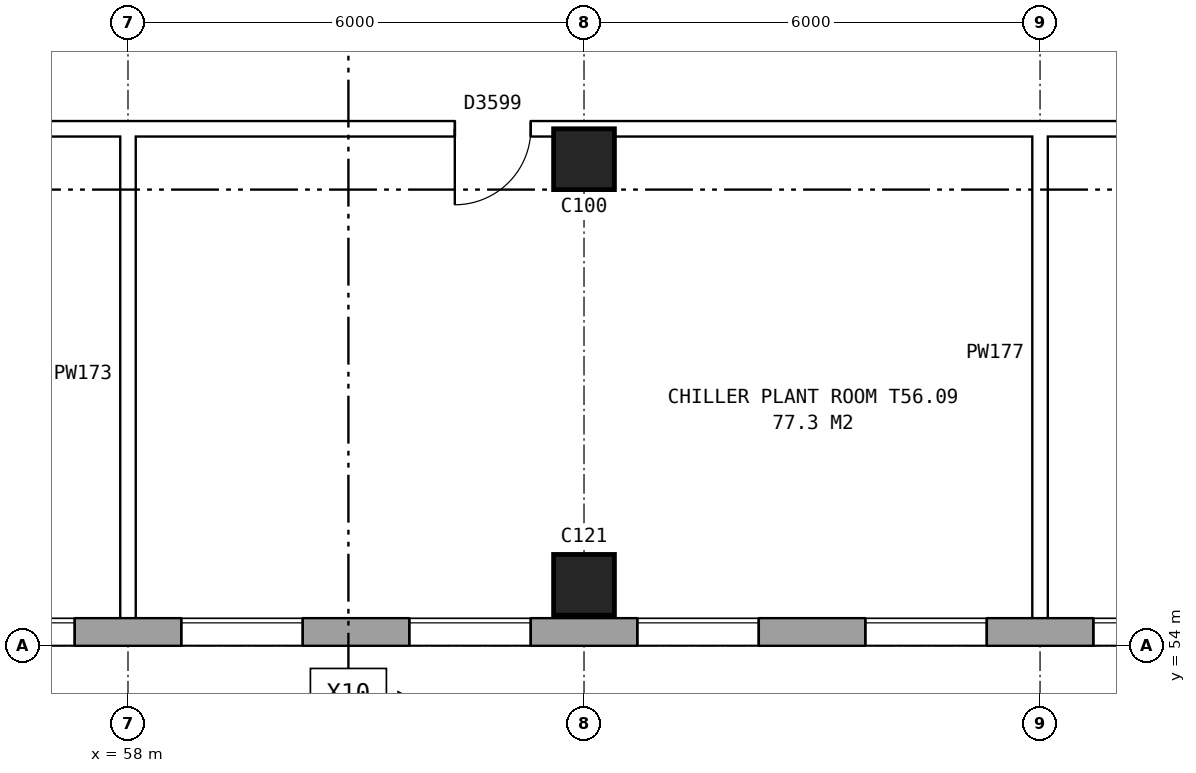
"""IFC4 building model, lengths in metres.
Left out: names, types, materials, properties, quantities, classifications, styles, units other than length and angle.
Written with IfcOpenShell. Run it as: python <this file> out.ifc"""

import sys

from ifc_helpers import new_model, si_unit, direction, frame, frame_2d, origin, origin_2d, place, context, subcontext, project, spatial, rectangle, extrude, element, fill, save


model = new_model("IFC4")
c1 = context("Model", 3, precision=1e-05, world=origin(), true_north=direction((0.0, 1.0)))
c2 = subcontext(c1, "Body", "Model", "MODEL_VIEW")
j1 = project(units=[si_unit("LENGTHUNIT", "METRE"), si_unit("PLANEANGLEUNIT", "RADIAN")], contexts=[c1])
p1 = place(None, origin())
s1 = spatial("IfcSite", under=j1, at=p1, CompositionType="ELEMENT")
p2 = place(p1, origin())
s2 = spatial("IfcBuilding", under=s1, at=p2, CompositionType="ELEMENT")
p3 = place(p2, frame((0.0, 0.0, 198.6)))
s3 = spatial("IfcBuildingStorey", under=s2, at=p3, CompositionType="ELEMENT", Elevation=198.6)
for number, where, z_axis, x_axis in (
    (1, (64.0, 54.8, 0.0), (0.0, 0.0, 1.0), (1.0, 0.0, 0.0)),
    (2, (64.0, 60.4, 0.0), (0.0, 0.0, 1.0), (1.0, 0.0, 0.0)),
):
    element("IfcColumn", number, at=place(p3, frame(where, z_axis=z_axis, x_axis=x_axis)), inside=s3, PredefinedType="COLUMN", context=c2, shape_type="SweptSolid", body=[
        extrude(rectangle(XDim=0.8, YDim=0.8, at=origin_2d()), origin(), (0.0, 0.0, 1.0), 3.7),
    ])
p4 = place(p3, frame((35.075, 54.18, 0.0), z_axis=(0.0, 0.0, 1.0), x_axis=(1.0, 0.0, 0.0)))
e3 = element("IfcWall", 3, at=p4, inside=s3, PredefinedType="STANDARD", context=c2, shape_type="SweptSolid", body=[
    extrude(rectangle(XDim=39.875, YDim=0.36, at=frame_2d((19.938, 0.0))), origin(), (0.0, 0.0, 1.0), 3.7),
])
p5 = place(p4, frame((2.625, 0.0, 1.5)))
e4 = element("IfcOpeningElement", 4, at=p5, cuts=e3, PredefinedType="OPENING", context=c2, shape_type="SweptSolid", body=[
    extrude(rectangle(XDim=1.6, YDim=1.2, at=frame_2d((0.8, 0.6))), frame((0.0, 0.19, 0.0), z_axis=(0.0, -1.0, 0.0), x_axis=(1.0, 0.0, 0.0)), (0.0, 0.0, 1.0), 0.38),
])
p6 = place(p4, frame((5.625, 0.0, 1.5)))
e5 = element("IfcOpeningElement", 5, at=p6, cuts=e3, PredefinedType="OPENING", context=c2, shape_type="SweptSolid", body=[
    extrude(rectangle(XDim=1.6, YDim=1.2, at=frame_2d((0.8, 0.6))), frame((0.0, 0.19, 0.0), z_axis=(0.0, -1.0, 0.0), x_axis=(1.0, 0.0, 0.0)), (0.0, 0.0, 1.0), 0.38),
])
p7 = place(p4, frame((8.625, 0.0, 1.5)))
e6 = element("IfcOpeningElement", 6, at=p7, cuts=e3, PredefinedType="OPENING", context=c2, shape_type="SweptSolid", body=[
    extrude(rectangle(XDim=1.6, YDim=1.2, at=frame_2d((0.8, 0.6))), frame((0.0, 0.19, 0.0), z_axis=(0.0, -1.0, 0.0), x_axis=(1.0, 0.0, 0.0)), (0.0, 0.0, 1.0), 0.38),
])
p8 = place(p4, frame((11.625, 0.0, 1.5)))
e7 = element("IfcOpeningElement", 7, at=p8, cuts=e3, PredefinedType="OPENING", context=c2, shape_type="SweptSolid", body=[
    extrude(rectangle(XDim=1.6, YDim=1.2, at=frame_2d((0.8, 0.6))), frame((0.0, 0.19, 0.0), z_axis=(0.0, -1.0, 0.0), x_axis=(1.0, 0.0, 0.0)), (0.0, 0.0, 1.0), 0.38),
])
p9 = place(p4, frame((14.625, 0.0, 1.5)))
e8 = element("IfcOpeningElement", 8, at=p9, cuts=e3, PredefinedType="OPENING", context=c2, shape_type="SweptSolid", body=[
    extrude(rectangle(XDim=1.6, YDim=1.2, at=frame_2d((0.8, 0.6))), frame((0.0, 0.19, 0.0), z_axis=(0.0, -1.0, 0.0), x_axis=(1.0, 0.0, 0.0)), (0.0, 0.0, 1.0), 0.38),
])
p10 = place(p4, frame((17.625, 0.0, 1.5)))
e9 = element("IfcOpeningElement", 9, at=p10, cuts=e3, PredefinedType="OPENING", context=c2, shape_type="SweptSolid", body=[
    extrude(rectangle(XDim=1.6, YDim=1.2, at=frame_2d((0.8, 0.6))), frame((0.0, 0.19, 0.0), z_axis=(0.0, -1.0, 0.0), x_axis=(1.0, 0.0, 0.0)), (0.0, 0.0, 1.0), 0.38),
])
p11 = place(p4, frame((20.625, 0.0, 1.5)))
e10 = element("IfcOpeningElement", 10, at=p11, cuts=e3, PredefinedType="OPENING", context=c2, shape_type="SweptSolid", body=[
    extrude(rectangle(XDim=1.6, YDim=1.2, at=frame_2d((0.8, 0.6))), frame((0.0, 0.19, 0.0), z_axis=(0.0, -1.0, 0.0), x_axis=(1.0, 0.0, 0.0)), (0.0, 0.0, 1.0), 0.38),
])
p12 = place(p4, frame((23.625, 0.0, 1.5)))
e11 = element("IfcOpeningElement", 11, at=p12, cuts=e3, PredefinedType="OPENING", context=c2, shape_type="SweptSolid", body=[
    extrude(rectangle(XDim=1.6, YDim=1.2, at=frame_2d((0.8, 0.6))), frame((0.0, 0.19, 0.0), z_axis=(0.0, -1.0, 0.0), x_axis=(1.0, 0.0, 0.0)), (0.0, 0.0, 1.0), 0.38),
])
p13 = place(p4, frame((26.625, 0.0, 1.5)))
e12 = element("IfcOpeningElement", 12, at=p13, cuts=e3, PredefinedType="OPENING", context=c2, shape_type="SweptSolid", body=[
    extrude(rectangle(XDim=1.6, YDim=1.2, at=frame_2d((0.8, 0.6))), frame((0.0, 0.19, 0.0), z_axis=(0.0, -1.0, 0.0), x_axis=(1.0, 0.0, 0.0)), (0.0, 0.0, 1.0), 0.38),
])
p14 = place(p4, frame((29.625, 0.0, 1.5)))
e13 = element("IfcOpeningElement", 13, at=p14, cuts=e3, PredefinedType="OPENING", context=c2, shape_type="SweptSolid", body=[
    extrude(rectangle(XDim=1.6, YDim=1.2, at=frame_2d((0.8, 0.6))), frame((0.0, 0.19, 0.0), z_axis=(0.0, -1.0, 0.0), x_axis=(1.0, 0.0, 0.0)), (0.0, 0.0, 1.0), 0.38),
])
p15 = place(p4, frame((32.625, 0.0, 1.5)))
e14 = element("IfcOpeningElement", 14, at=p15, cuts=e3, PredefinedType="OPENING", context=c2, shape_type="SweptSolid", body=[
    extrude(rectangle(XDim=1.6, YDim=1.2, at=frame_2d((0.8, 0.6))), frame((0.0, 0.19, 0.0), z_axis=(0.0, -1.0, 0.0), x_axis=(1.0, 0.0, 0.0)), (0.0, 0.0, 1.0), 0.38),
])
p16 = place(p4, frame((35.625, 0.0, 1.5)))
e15 = element("IfcOpeningElement", 15, at=p16, cuts=e3, PredefinedType="OPENING", context=c2, shape_type="SweptSolid", body=[
    extrude(rectangle(XDim=1.6, YDim=1.2, at=frame_2d((0.8, 0.6))), frame((0.0, 0.19, 0.0), z_axis=(0.0, -1.0, 0.0), x_axis=(1.0, 0.0, 0.0)), (0.0, 0.0, 1.0), 0.38),
])
p17 = place(p3, frame((32.24, 60.8, 0.0), z_axis=(0.0, 0.0, 1.0), x_axis=(1.0, 0.0, 0.0)))
e16 = element("IfcWall", 16, at=p17, inside=s3, PredefinedType="PARTITIONING", context=c2, shape_type="SweptSolid", body=[
    extrude(rectangle(XDim=136.52, YDim=0.2, at=frame_2d((68.26, 0.0))), origin(), (0.0, 0.0, 1.0), 3.7),
])
p18 = place(p17, frame((1.94, 0.0, 0.0)))
e17 = element("IfcOpeningElement", 17, at=p18, cuts=e16, PredefinedType="OPENING", context=c2, shape_type="SweptSolid", body=[
    extrude(rectangle(XDim=1.0, YDim=2.1, at=frame_2d((0.5, 1.05))), frame((0.0, 0.11, 0.0), z_axis=(0.0, -1.0, 0.0), x_axis=(1.0, 0.0, 0.0)), (0.0, 0.0, 1.0), 0.22),
])
p19 = place(p17, frame((8.76, 0.0, 0.0)))
e18 = element("IfcOpeningElement", 18, at=p19, cuts=e16, PredefinedType="OPENING", context=c2, shape_type="SweptSolid", body=[
    extrude(rectangle(XDim=1.0, YDim=2.1, at=frame_2d((0.5, 1.05))), frame((0.0, 0.11, 0.0), z_axis=(0.0, -1.0, 0.0), x_axis=(1.0, 0.0, 0.0)), (0.0, 0.0, 1.0), 0.22),
])
p20 = place(p17, frame((20.46, 0.0, 0.0)))
e19 = element("IfcOpeningElement", 19, at=p20, cuts=e16, PredefinedType="OPENING", context=c2, shape_type="SweptSolid", body=[
    extrude(rectangle(XDim=1.0, YDim=2.1, at=frame_2d((0.5, 1.05))), frame((0.0, 0.11, 0.0), z_axis=(0.0, -1.0, 0.0), x_axis=(1.0, 0.0, 0.0)), (0.0, 0.0, 1.0), 0.22),
])
p21 = place(p17, frame((30.06, 0.0, 0.0)))
e20 = element("IfcOpeningElement", 20, at=p21, cuts=e16, PredefinedType="OPENING", context=c2, shape_type="SweptSolid", body=[
    extrude(rectangle(XDim=1.0, YDim=2.1, at=frame_2d((0.5, 1.05))), frame((0.0, 0.11, 0.0), z_axis=(0.0, -1.0, 0.0), x_axis=(1.0, 0.0, 0.0)), (0.0, 0.0, 1.0), 0.22),
])
p22 = place(p17, frame((40.08, 0.0, 0.0)))
e21 = element("IfcOpeningElement", 21, at=p22, cuts=e16, PredefinedType="OPENING", context=c2, shape_type="SweptSolid", body=[
    extrude(rectangle(XDim=1.0, YDim=2.1, at=frame_2d((0.5, 1.05))), frame((0.0, 0.11, 0.0), z_axis=(0.0, -1.0, 0.0), x_axis=(1.0, 0.0, 0.0)), (0.0, 0.0, 1.0), 0.22),
])
p23 = place(p17, frame((46.517, 0.0, 0.0)))
e22 = element("IfcOpeningElement", 22, at=p23, cuts=e16, PredefinedType="OPENING", context=c2, shape_type="SweptSolid", body=[
    extrude(rectangle(XDim=1.0, YDim=2.1, at=frame_2d((0.5, 1.05))), frame((0.0, 0.11, 0.0), z_axis=(0.0, -1.0, 0.0), x_axis=(1.0, 0.0, 0.0)), (0.0, 0.0, 1.0), 0.22),
])
p24 = place(p17, frame((57.01, 0.0, 0.0)))
e23 = element("IfcOpeningElement", 23, at=p24, cuts=e16, PredefinedType="OPENING", context=c2, shape_type="SweptSolid", body=[
    extrude(rectangle(XDim=1.0, YDim=2.1, at=frame_2d((0.5, 1.05))), frame((0.0, 0.11, 0.0), z_axis=(0.0, -1.0, 0.0), x_axis=(1.0, 0.0, 0.0)), (0.0, 0.0, 1.0), 0.22),
])
p25 = place(p17, frame((70.76, 0.0, 0.0)))
e24 = element("IfcOpeningElement", 24, at=p25, cuts=e16, PredefinedType="OPENING", context=c2, shape_type="SweptSolid", body=[
    extrude(rectangle(XDim=1.0, YDim=2.1, at=frame_2d((0.5, 1.05))), frame((0.0, 0.11, 0.0), z_axis=(0.0, -1.0, 0.0), x_axis=(1.0, 0.0, 0.0)), (0.0, 0.0, 1.0), 0.22),
])
p26 = place(p17, frame((84.51, 0.0, 0.0)))
e25 = element("IfcOpeningElement", 25, at=p26, cuts=e16, PredefinedType="OPENING", context=c2, shape_type="SweptSolid", body=[
    extrude(rectangle(XDim=1.0, YDim=2.1, at=frame_2d((0.5, 1.05))), frame((0.0, 0.11, 0.0), z_axis=(0.0, -1.0, 0.0), x_axis=(1.0, 0.0, 0.0)), (0.0, 0.0, 1.0), 0.22),
])
p27 = place(p17, frame((95.003, 0.0, 0.0)))
e26 = element("IfcOpeningElement", 26, at=p27, cuts=e16, PredefinedType="OPENING", context=c2, shape_type="SweptSolid", body=[
    extrude(rectangle(XDim=1.0, YDim=2.1, at=frame_2d((0.5, 1.05))), frame((0.0, 0.11, 0.0), z_axis=(0.0, -1.0, 0.0), x_axis=(1.0, 0.0, 0.0)), (0.0, 0.0, 1.0), 0.22),
])
p28 = place(p17, frame((101.44, 0.0, 0.0)))
e27 = element("IfcOpeningElement", 27, at=p28, cuts=e16, PredefinedType="OPENING", context=c2, shape_type="SweptSolid", body=[
    extrude(rectangle(XDim=1.0, YDim=2.1, at=frame_2d((0.5, 1.05))), frame((0.0, 0.11, 0.0), z_axis=(0.0, -1.0, 0.0), x_axis=(1.0, 0.0, 0.0)), (0.0, 0.0, 1.0), 0.22),
])
p29 = place(p17, frame((111.56, 0.0, 0.0)))
e28 = element("IfcOpeningElement", 28, at=p29, cuts=e16, PredefinedType="OPENING", context=c2, shape_type="SweptSolid", body=[
    extrude(rectangle(XDim=1.0, YDim=2.1, at=frame_2d((0.5, 1.05))), frame((0.0, 0.11, 0.0), z_axis=(0.0, -1.0, 0.0), x_axis=(1.0, 0.0, 0.0)), (0.0, 0.0, 1.0), 0.22),
])
p30 = place(p17, frame((123.56, 0.0, 0.0)))
e29 = element("IfcOpeningElement", 29, at=p30, cuts=e16, PredefinedType="OPENING", context=c2, shape_type="SweptSolid", body=[
    extrude(rectangle(XDim=1.0, YDim=2.1, at=frame_2d((0.5, 1.05))), frame((0.0, 0.11, 0.0), z_axis=(0.0, -1.0, 0.0), x_axis=(1.0, 0.0, 0.0)), (0.0, 0.0, 1.0), 0.22),
])
p31 = place(p17, frame((132.08, 0.0, 0.0)))
e30 = element("IfcOpeningElement", 30, at=p31, cuts=e16, PredefinedType="OPENING", context=c2, shape_type="SweptSolid", body=[
    extrude(rectangle(XDim=1.0, YDim=2.1, at=frame_2d((0.5, 1.05))), frame((0.0, 0.11, 0.0), z_axis=(0.0, -1.0, 0.0), x_axis=(1.0, 0.0, 0.0)), (0.0, 0.0, 1.0), 0.22),
])
for number, where, z_axis, x_axis in (
    (31, (58.0, 54.24, 0.0), (0.0, 0.0, 1.0), (0.0, 1.0, 0.0)),
    (32, (70.0, 54.24, 0.0), (0.0, 0.0, 1.0), (0.0, 1.0, 0.0)),
):
    element("IfcWall", number, at=place(p3, frame(where, z_axis=z_axis, x_axis=x_axis)), inside=s3, PredefinedType="PARTITIONING", context=c2, shape_type="SweptSolid", body=[
        extrude(rectangle(XDim=6.66, YDim=0.2, at=frame_2d((3.33, 0.0))), origin(), (0.0, 0.0, 1.0), 3.7),
    ])
p32 = place(p11, origin())
e33 = element("IfcWindow", 33, at=p32, inside=s3, PartitioningType="DOUBLE_PANEL_HORIZONTAL", PredefinedType="WINDOW", context=c2, shape_type="SweptSolid", body=[
    extrude(rectangle(XDim=1.6, YDim=1.2, at=frame_2d((0.8, 0.6))), frame((0.0, 0.15, 0.0), z_axis=(0.0, -1.0, 0.0), x_axis=(1.0, 0.0, 0.0)), (0.0, 0.0, 1.0), 0.06),
])
fill(e10, e33)
p33 = place(p12, origin())
e34 = element("IfcWindow", 34, at=p33, inside=s3, PartitioningType="DOUBLE_PANEL_HORIZONTAL", PredefinedType="WINDOW", context=c2, shape_type="SweptSolid", body=[
    extrude(rectangle(XDim=1.6, YDim=1.2, at=frame_2d((0.8, 0.6))), frame((0.0, 0.15, 0.0), z_axis=(0.0, -1.0, 0.0), x_axis=(1.0, 0.0, 0.0)), (0.0, 0.0, 1.0), 0.06),
])
fill(e11, e34)
p34 = place(p13, origin())
e35 = element("IfcWindow", 35, at=p34, inside=s3, PartitioningType="DOUBLE_PANEL_HORIZONTAL", PredefinedType="WINDOW", context=c2, shape_type="SweptSolid", body=[
    extrude(rectangle(XDim=1.6, YDim=1.2, at=frame_2d((0.8, 0.6))), frame((0.0, 0.15, 0.0), z_axis=(0.0, -1.0, 0.0), x_axis=(1.0, 0.0, 0.0)), (0.0, 0.0, 1.0), 0.06),
])
fill(e12, e35)
p35 = place(p14, origin())
e36 = element("IfcWindow", 36, at=p35, inside=s3, PartitioningType="DOUBLE_PANEL_HORIZONTAL", PredefinedType="WINDOW", context=c2, shape_type="SweptSolid", body=[
    extrude(rectangle(XDim=1.6, YDim=1.2, at=frame_2d((0.8, 0.6))), frame((0.0, 0.15, 0.0), z_axis=(0.0, -1.0, 0.0), x_axis=(1.0, 0.0, 0.0)), (0.0, 0.0, 1.0), 0.06),
])
fill(e13, e36)
p36 = place(p15, origin())
e37 = element("IfcWindow", 37, at=p36, inside=s3, PartitioningType="DOUBLE_PANEL_HORIZONTAL", PredefinedType="WINDOW", context=c2, shape_type="SweptSolid", body=[
    extrude(rectangle(XDim=1.6, YDim=1.2, at=frame_2d((0.8, 0.6))), frame((0.0, 0.15, 0.0), z_axis=(0.0, -1.0, 0.0), x_axis=(1.0, 0.0, 0.0)), (0.0, 0.0, 1.0), 0.06),
])
fill(e14, e37)
p37 = place(p16, origin())
e38 = element("IfcWindow", 38, at=p37, inside=s3, PartitioningType="DOUBLE_PANEL_HORIZONTAL", PredefinedType="WINDOW", context=c2, shape_type="SweptSolid", body=[
    extrude(rectangle(XDim=1.6, YDim=1.2, at=frame_2d((0.8, 0.6))), frame((0.0, 0.15, 0.0), z_axis=(0.0, -1.0, 0.0), x_axis=(1.0, 0.0, 0.0)), (0.0, 0.0, 1.0), 0.06),
])
fill(e15, e38)
p38 = place(p21, frame((1.0, 0.0, 0.0), z_axis=(0.0, 0.0, 1.0), x_axis=(-1.0, 0.0, 0.0)))
e39 = element("IfcDoor", 39, at=p38, inside=s3, OperationType="SINGLE_SWING_RIGHT", PredefinedType="DOOR", context=c2, shape_type="SweptSolid", body=[
    extrude(rectangle(XDim=1.0, YDim=2.1, at=frame_2d((0.5, 1.05))), frame((0.0, 0.025, 0.0), z_axis=(0.0, -1.0, 0.0), x_axis=(1.0, 0.0, 0.0)), (0.0, 0.0, 1.0), 0.05),
])
fill(e20, e39)
save(model, sys.argv[1])
